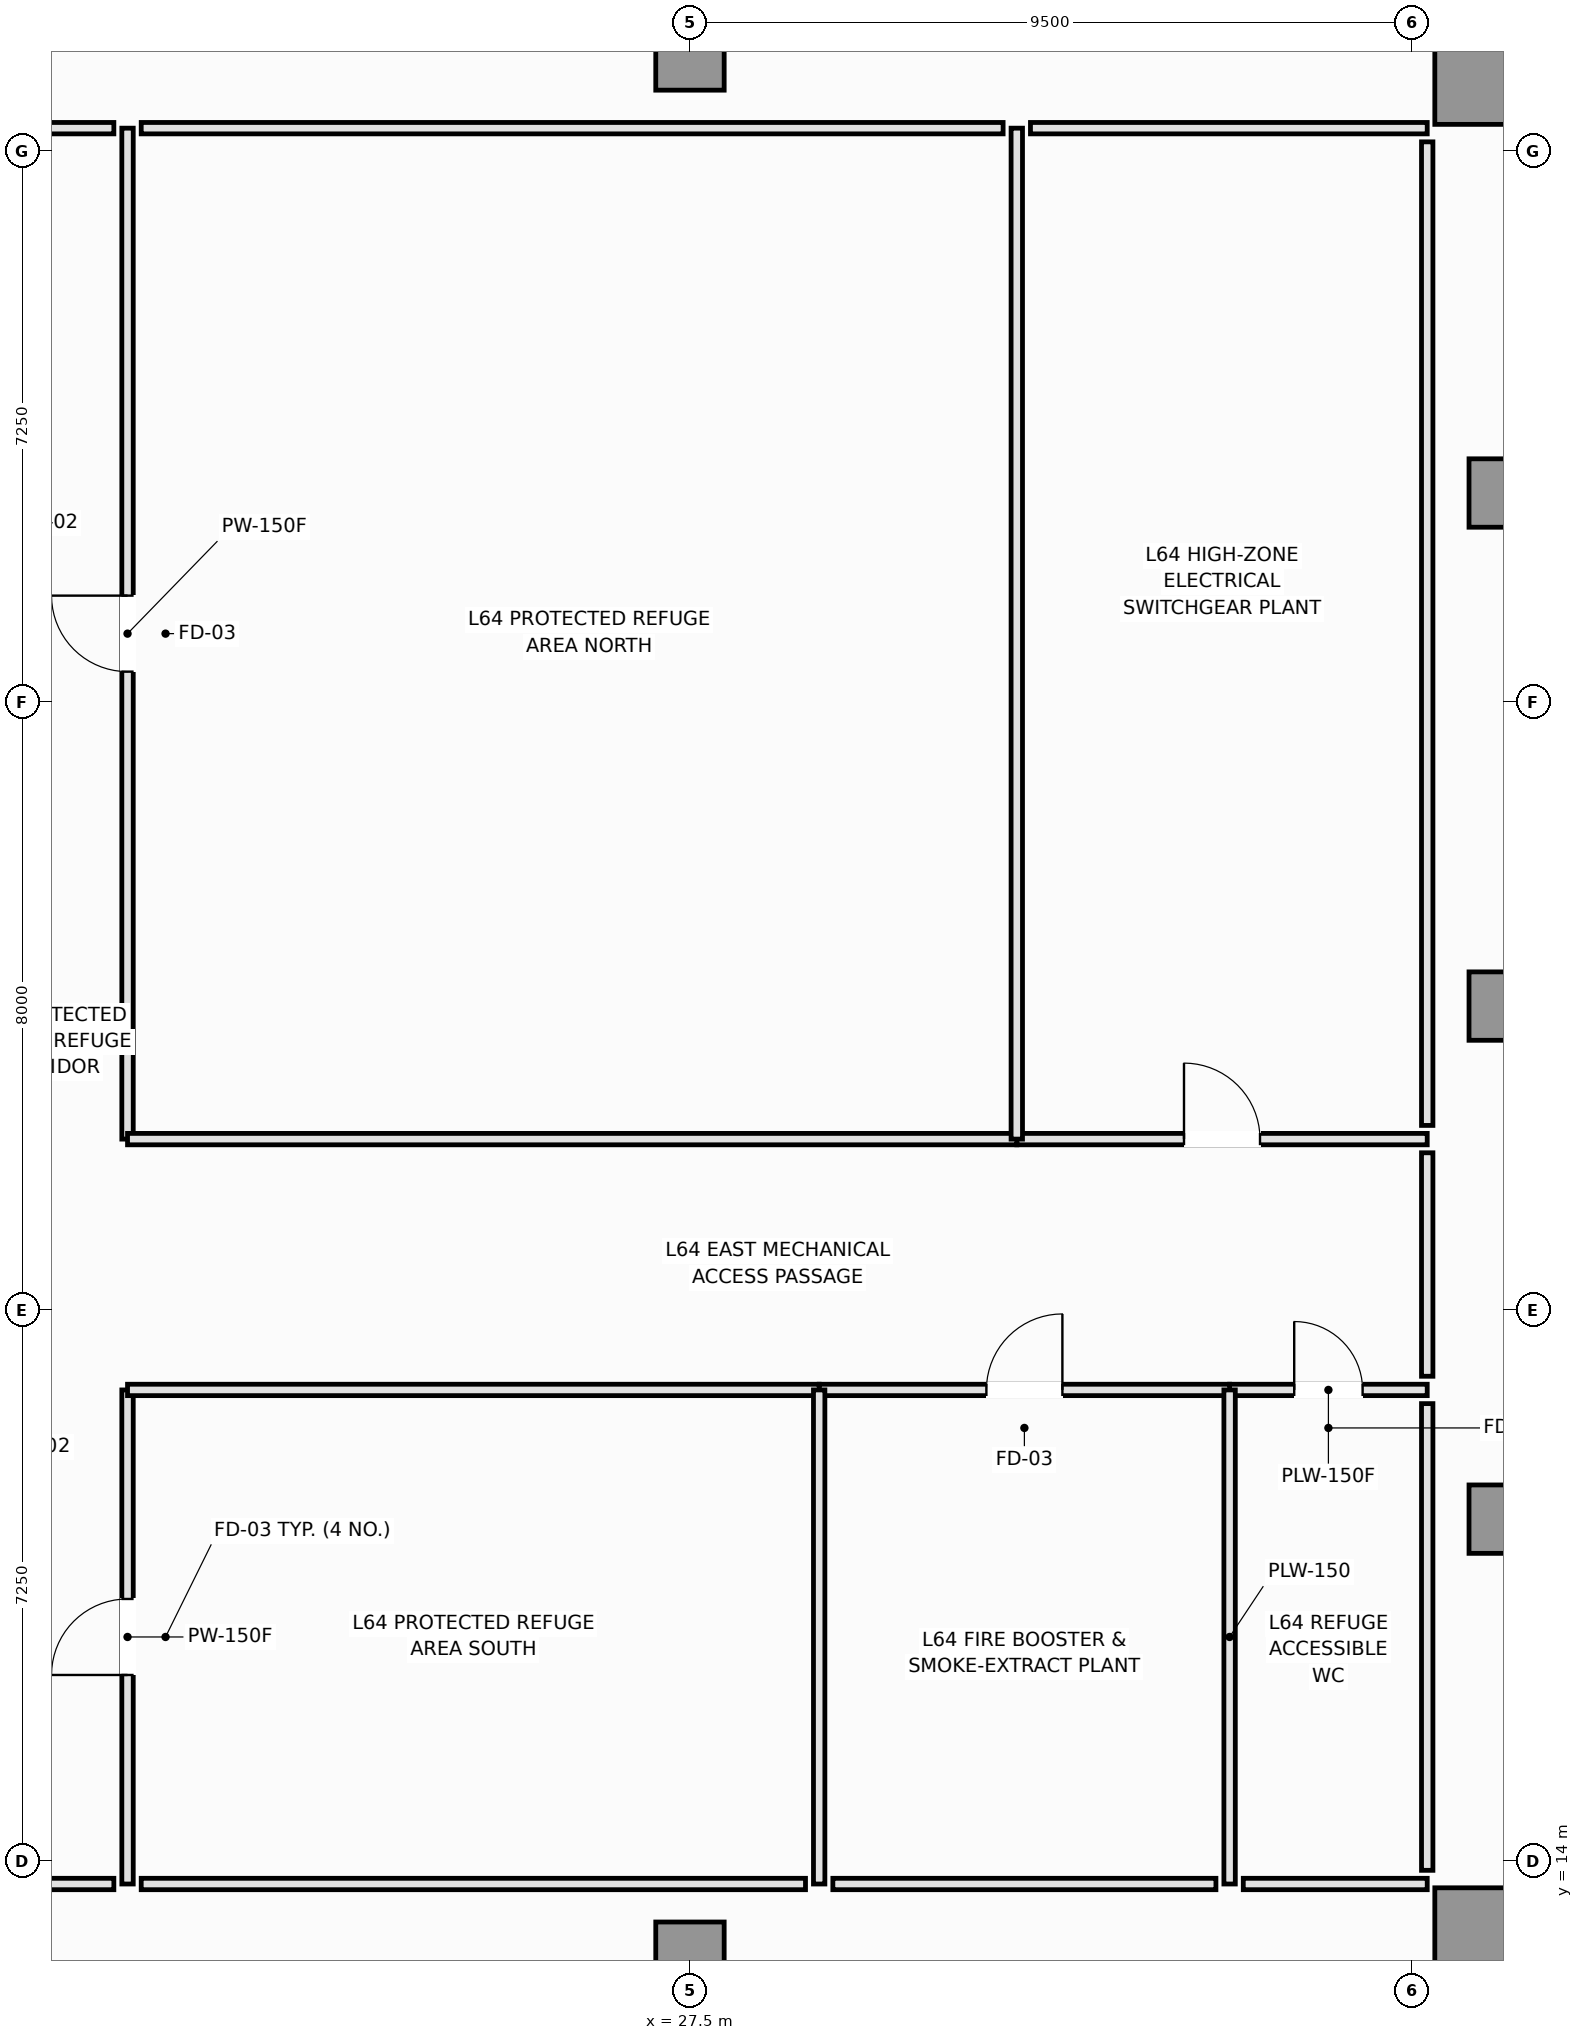
"""IFC4 building model, lengths in metres.
Left out: names, types, materials, properties, quantities, classifications, styles, units other than length and angle.
Written with IfcOpenShell. Run it as: python <this file> out.ifc"""

import sys

from ifc_helpers import new_model, si_unit, direction, frame, frame_2d, origin, origin_2d, place, context, subcontext, project, spatial, rectangle, extrude, element, fill, save


model = new_model("IFC4")
c1 = context("Model", 3, precision=1e-05, world=origin(), true_north=direction((0.0, 1.0)))
c2 = subcontext(c1, "Body", "Model", "MODEL_VIEW")
j1 = project(units=[si_unit("LENGTHUNIT", "METRE"), si_unit("PLANEANGLEUNIT", "RADIAN")], contexts=[c1])
p1 = place(None, origin())
s1 = spatial("IfcSite", under=j1, at=p1, CompositionType="ELEMENT")
p2 = place(p1, origin())
s2 = spatial("IfcBuilding", under=s1, at=p2, CompositionType="ELEMENT")
p3 = place(p2, frame((0.0, 0.0, 241.3)))
s3 = spatial("IfcBuildingStorey", under=s2, at=p3, CompositionType="ELEMENT", Elevation=241.3)
for number, where, z_axis, x_axis in (
    (1, (38.2, 12.75, 0.0), (0.0, 0.0, 1.0), (1.0, 0.0, 0.0)),
    (2, (38.2, 37.75, 0.0), (0.0, 0.0, 1.0), (1.0, 0.0, 0.0)),
):
    element("IfcColumn", number, at=place(p3, frame(where, z_axis=z_axis, x_axis=x_axis)), inside=s3, PredefinedType="COLUMN", context=c2, shape_type="SweptSolid", body=[
        extrude(rectangle(XDim=1.8, YDim=1.8, at=origin_2d()), origin(), (0.0, 0.0, 1.0), 3.55),
    ])
for number, where, z_axis, x_axis in (
    (3, (27.5, 12.75, 0.0), (0.0, 0.0, 1.0), (1.0, 0.0, 0.0)),
    (4, (27.5, 37.75, 0.0), (0.0, 0.0, 1.0), (1.0, 0.0, 0.0)),
    (5, (38.2, 18.5, 0.0), (0.0, 0.0, 1.0), (1.0, 0.0, 0.0)),
    (6, (38.2, 25.25, 0.0), (0.0, 0.0, 1.0), (1.0, 0.0, 0.0)),
    (7, (38.2, 32.0, 0.0), (0.0, 0.0, 1.0), (1.0, 0.0, 0.0)),
):
    element("IfcColumn", number, at=place(p3, frame(where, z_axis=z_axis, x_axis=x_axis)), inside=s3, PredefinedType="COLUMN", context=c2, shape_type="SweptSolid", body=[
        extrude(rectangle(XDim=0.9, YDim=0.9, at=origin_2d()), origin(), (0.0, 0.0, 1.0), 3.55),
    ])
p4 = place(p3, frame((20.1, 13.7, 0.0), z_axis=(0.0, 0.0, 1.0), x_axis=(0.0, 1.0, 0.0)))
e8 = element("IfcWall", 8, at=p4, inside=s3, PredefinedType="PARTITIONING", context=c2, shape_type="SweptSolid", body=[
    extrude(rectangle(XDim=6.5, YDim=0.15, at=frame_2d((3.25, 0.0))), origin(), (0.0, 0.0, 1.0), 3.39),
])
p5 = place(p4, frame((2.75, 0.0, 0.0)))
e9 = element("IfcOpeningElement", 9, at=p5, cuts=e8, PredefinedType="OPENING", context=c2, shape_type="SweptSolid", body=[
    extrude(rectangle(XDim=1.0, YDim=2.15, at=frame_2d((0.5, 1.075))), frame((0.0, 0.085, 0.0), z_axis=(0.0, -1.0, 0.0), x_axis=(1.0, 0.0, 0.0)), (0.0, 0.0, 1.0), 0.17),
])
p6 = place(p3, frame((20.1, 23.5, 0.0), z_axis=(0.0, 0.0, 1.0), x_axis=(0.0, 1.0, 0.0)))
e10 = element("IfcWall", 10, at=p6, inside=s3, PredefinedType="PARTITIONING", context=c2, shape_type="SweptSolid", body=[
    extrude(rectangle(XDim=13.3, YDim=0.15, at=frame_2d((6.65, 0.0))), origin(), (0.0, 0.0, 1.0), 3.39),
])
p7 = place(p6, frame((6.15, 0.0, 0.0)))
e11 = element("IfcOpeningElement", 11, at=p7, cuts=e10, PredefinedType="OPENING", context=c2, shape_type="SweptSolid", body=[
    extrude(rectangle(XDim=1.0, YDim=2.15, at=frame_2d((0.5, 1.075))), frame((0.0, 0.085, 0.0), z_axis=(0.0, -1.0, 0.0), x_axis=(1.0, 0.0, 0.0)), (0.0, 0.0, 1.0), 0.17),
])
p8 = place(p3, frame((34.6, 20.2, 0.0), z_axis=(0.0, 0.0, 1.0), x_axis=(1.0, 0.0, 0.0)))
e12 = element("IfcWall", 12, at=p8, inside=s3, PredefinedType="PLUMBINGWALL", context=c2, shape_type="SweptSolid", body=[
    extrude(rectangle(XDim=2.6, YDim=0.15, at=frame_2d((1.3, 0.0))), origin(), (0.0, 0.0, 1.0), 3.39),
])
p9 = place(p8, frame((0.85, 0.0, 0.0)))
e13 = element("IfcOpeningElement", 13, at=p9, cuts=e12, PredefinedType="OPENING", context=c2, shape_type="SweptSolid", body=[
    extrude(rectangle(XDim=0.9, YDim=2.1, at=frame_2d((0.45, 1.05))), frame((0.0, 0.085, 0.0), z_axis=(0.0, -1.0, 0.0), x_axis=(1.0, 0.0, 0.0)), (0.0, 0.0, 1.0), 0.17),
])
p10 = place(p3, frame((29.2, 20.2, 0.0), z_axis=(0.0, 0.0, 1.0), x_axis=(1.0, 0.0, 0.0)))
e14 = element("IfcWall", 14, at=p10, inside=s3, PredefinedType="PARTITIONING", context=c2, shape_type="SweptSolid", body=[
    extrude(rectangle(XDim=5.4, YDim=0.15, at=frame_2d((2.7, 0.0))), origin(), (0.0, 0.0, 1.0), 3.39),
])
p11 = place(p10, frame((2.2, 0.0, 0.0)))
e15 = element("IfcOpeningElement", 15, at=p11, cuts=e14, PredefinedType="OPENING", context=c2, shape_type="SweptSolid", body=[
    extrude(rectangle(XDim=1.0, YDim=2.15, at=frame_2d((0.5, 1.075))), frame((0.0, 0.085, 0.0), z_axis=(0.0, -1.0, 0.0), x_axis=(1.0, 0.0, 0.0)), (0.0, 0.0, 1.0), 0.17),
])
p12 = place(p3, frame((20.1, 20.2, 0.0), z_axis=(0.0, 0.0, 1.0), x_axis=(1.0, 0.0, 0.0)))
e16 = element("IfcWall", 16, at=p12, inside=s3, PredefinedType="PARTITIONING", context=c2, shape_type="SweptSolid", body=[
    extrude(rectangle(XDim=9.1, YDim=0.15, at=frame_2d((4.55, 0.0))), origin(), (0.0, 0.0, 1.0), 3.39),
])
p13 = place(p3, frame((31.8, 23.5, 0.0), z_axis=(0.0, 0.0, 1.0), x_axis=(1.0, 0.0, 0.0)))
e17 = element("IfcWall", 17, at=p13, inside=s3, PredefinedType="PARTITIONING", context=c2, shape_type="SweptSolid", body=[
    extrude(rectangle(XDim=5.4, YDim=0.15, at=frame_2d((2.7, 0.0))), origin(), (0.0, 0.0, 1.0), 3.39),
])
p14 = place(p13, frame((2.2, 0.0, 0.0)))
e18 = element("IfcOpeningElement", 18, at=p14, cuts=e17, PredefinedType="OPENING", context=c2, shape_type="SweptSolid", body=[
    extrude(rectangle(XDim=1.0, YDim=2.15, at=frame_2d((0.5, 1.075))), frame((0.0, 0.085, 0.0), z_axis=(0.0, -1.0, 0.0), x_axis=(1.0, 0.0, 0.0)), (0.0, 0.0, 1.0), 0.17),
])
p15 = place(p3, frame((20.1, 23.5, 0.0), z_axis=(0.0, 0.0, 1.0), x_axis=(1.0, 0.0, 0.0)))
e19 = element("IfcWall", 19, at=p15, inside=s3, PredefinedType="PARTITIONING", context=c2, shape_type="SweptSolid", body=[
    extrude(rectangle(XDim=11.7, YDim=0.15, at=frame_2d((5.85, 0.0))), origin(), (0.0, 0.0, 1.0), 3.39),
])
p16 = place(p3, frame((34.6, 13.7, 0.0), z_axis=(0.0, 0.0, 1.0), x_axis=(0.0, 1.0, 0.0)))
e20 = element("IfcWall", 20, at=p16, inside=s3, PredefinedType="PLUMBINGWALL", context=c2, shape_type="SweptSolid", body=[
    extrude(rectangle(XDim=6.5, YDim=0.15, at=frame_2d((3.25, 0.0))), origin(), (0.0, 0.0, 1.0), 3.39),
])
p17 = place(p3, frame((29.2, 13.7, 0.0), z_axis=(0.0, 0.0, 1.0), x_axis=(0.0, 1.0, 0.0)))
e21 = element("IfcWall", 21, at=p17, inside=s3, PredefinedType="PARTITIONING", context=c2, shape_type="SweptSolid", body=[
    extrude(rectangle(XDim=6.5, YDim=0.15, at=frame_2d((3.25, 0.0))), origin(), (0.0, 0.0, 1.0), 3.39),
])
p18 = place(p3, frame((31.8, 23.5, 0.0), z_axis=(0.0, 0.0, 1.0), x_axis=(0.0, 1.0, 0.0)))
e22 = element("IfcWall", 22, at=p18, inside=s3, PredefinedType="PARTITIONING", context=c2, shape_type="SweptSolid", body=[
    extrude(rectangle(XDim=13.3, YDim=0.15, at=frame_2d((6.65, 0.0))), origin(), (0.0, 0.0, 1.0), 3.39),
])
p19 = place(p3, frame((37.2, 13.7, 0.0), z_axis=(0.0, 0.0, 1.0), x_axis=(-1.0, 0.0, 0.0)))
e23 = element("IfcWall", 23, at=p19, inside=s3, PredefinedType="PARTITIONING", context=c2, shape_type="SweptSolid", body=[
    extrude(rectangle(XDim=2.42, YDim=0.15, at=frame_2d((1.21, 0.0))), origin(), (0.0, 0.0, 1.0), 3.39),
])
p20 = place(p3, frame((34.42, 13.7, 0.0), z_axis=(0.0, 0.0, 1.0), x_axis=(-1.0, 0.0, 0.0)))
e24 = element("IfcWall", 24, at=p20, inside=s3, PredefinedType="PARTITIONING", context=c2, shape_type="SweptSolid", body=[
    extrude(rectangle(XDim=5.04, YDim=0.15, at=frame_2d((2.52, 0.0))), origin(), (0.0, 0.0, 1.0), 3.39),
])
p21 = place(p3, frame((29.02, 13.7, 0.0), z_axis=(0.0, 0.0, 1.0), x_axis=(-1.0, 0.0, 0.0)))
e25 = element("IfcWall", 25, at=p21, inside=s3, PredefinedType="PARTITIONING", context=c2, shape_type="SweptSolid", body=[
    extrude(rectangle(XDim=8.74, YDim=0.15, at=frame_2d((4.37, 0.0))), origin(), (0.0, 0.0, 1.0), 3.39),
])
for number, where, z_axis, x_axis in (
    (26, (19.92, 13.7, 0.0), (0.0, 0.0, 1.0), (-1.0, 0.0, 0.0)),
    (27, (18.0, 36.8, 0.0), (0.0, 0.0, 1.0), (1.0, 0.0, 0.0)),
):
    element("IfcWall", number, at=place(p3, frame(where, z_axis=z_axis, x_axis=x_axis)), inside=s3, PredefinedType="PARTITIONING", context=c2, shape_type="SweptSolid", body=[
        extrude(rectangle(XDim=1.92, YDim=0.15, at=frame_2d((0.96, 0.0))), origin(), (0.0, 0.0, 1.0), 3.39),
    ])
p22 = place(p3, frame((20.28, 36.8, 0.0), z_axis=(0.0, 0.0, 1.0), x_axis=(1.0, 0.0, 0.0)))
e28 = element("IfcWall", 28, at=p22, inside=s3, PredefinedType="PARTITIONING", context=c2, shape_type="SweptSolid", body=[
    extrude(rectangle(XDim=11.34, YDim=0.15, at=frame_2d((5.67, 0.0))), origin(), (0.0, 0.0, 1.0), 3.39),
])
p23 = place(p3, frame((31.98, 36.8, 0.0), z_axis=(0.0, 0.0, 1.0), x_axis=(1.0, 0.0, 0.0)))
e29 = element("IfcWall", 29, at=p23, inside=s3, PredefinedType="PARTITIONING", context=c2, shape_type="SweptSolid", body=[
    extrude(rectangle(XDim=5.22, YDim=0.15, at=frame_2d((2.61, 0.0))), origin(), (0.0, 0.0, 1.0), 3.39),
])
p24 = place(p3, frame((37.2, 36.62, 0.0), z_axis=(0.0, 0.0, 1.0), x_axis=(0.0, -1.0, 0.0)))
e30 = element("IfcWall", 30, at=p24, inside=s3, PredefinedType="PARTITIONING", context=c2, shape_type="SweptSolid", body=[
    extrude(rectangle(XDim=12.94, YDim=0.15, at=frame_2d((6.47, 0.0))), origin(), (0.0, 0.0, 1.0), 3.39),
])
p25 = place(p3, frame((37.2, 23.32, 0.0), z_axis=(0.0, 0.0, 1.0), x_axis=(0.0, -1.0, 0.0)))
e31 = element("IfcWall", 31, at=p25, inside=s3, PredefinedType="PARTITIONING", context=c2, shape_type="SweptSolid", body=[
    extrude(rectangle(XDim=2.94, YDim=0.15, at=frame_2d((1.47, 0.0))), origin(), (0.0, 0.0, 1.0), 3.39),
])
p26 = place(p3, frame((37.2, 20.02, 0.0), z_axis=(0.0, 0.0, 1.0), x_axis=(0.0, -1.0, 0.0)))
e32 = element("IfcWall", 32, at=p26, inside=s3, PredefinedType="PARTITIONING", context=c2, shape_type="SweptSolid", body=[
    extrude(rectangle(XDim=6.14, YDim=0.15, at=frame_2d((3.07, 0.0))), origin(), (0.0, 0.0, 1.0), 3.39),
])
p27 = place(p5, origin())
e33 = element("IfcDoor", 33, at=p27, inside=s3, OperationType="SINGLE_SWING_LEFT", PredefinedType="DOOR", context=c2, shape_type="SweptSolid", body=[
    extrude(rectangle(XDim=1.0, YDim=2.15, at=frame_2d((0.5, 1.075))), frame((0.0, 0.025, 0.0), z_axis=(0.0, -1.0, 0.0), x_axis=(1.0, 0.0, 0.0)), (0.0, 0.0, 1.0), 0.05),
])
fill(e9, e33)
p28 = place(p7, origin())
e34 = element("IfcDoor", 34, at=p28, inside=s3, OperationType="SINGLE_SWING_RIGHT", PredefinedType="DOOR", context=c2, shape_type="SweptSolid", body=[
    extrude(rectangle(XDim=1.0, YDim=2.15, at=frame_2d((0.5, 1.075))), frame((0.0, 0.025, 0.0), z_axis=(0.0, -1.0, 0.0), x_axis=(1.0, 0.0, 0.0)), (0.0, 0.0, 1.0), 0.05),
])
fill(e11, e34)
p29 = place(p9, origin())
e35 = element("IfcDoor", 35, at=p29, inside=s3, OperationType="SINGLE_SWING_LEFT", PredefinedType="DOOR", context=c2, shape_type="SweptSolid", body=[
    extrude(rectangle(XDim=0.9, YDim=2.1, at=frame_2d((0.45, 1.05))), frame((0.0, 0.025, 0.0), z_axis=(0.0, -1.0, 0.0), x_axis=(1.0, 0.0, 0.0)), (0.0, 0.0, 1.0), 0.05),
])
fill(e13, e35)
p30 = place(p11, origin())
e36 = element("IfcDoor", 36, at=p30, inside=s3, OperationType="SINGLE_SWING_RIGHT", PredefinedType="DOOR", context=c2, shape_type="SweptSolid", body=[
    extrude(rectangle(XDim=1.0, YDim=2.15, at=frame_2d((0.5, 1.075))), frame((0.0, 0.025, 0.0), z_axis=(0.0, -1.0, 0.0), x_axis=(1.0, 0.0, 0.0)), (0.0, 0.0, 1.0), 0.05),
])
fill(e15, e36)
p31 = place(p14, origin())
e37 = element("IfcDoor", 37, at=p31, inside=s3, OperationType="SINGLE_SWING_LEFT", PredefinedType="DOOR", context=c2, shape_type="SweptSolid", body=[
    extrude(rectangle(XDim=1.0, YDim=2.15, at=frame_2d((0.5, 1.075))), frame((0.0, 0.025, 0.0), z_axis=(0.0, -1.0, 0.0), x_axis=(1.0, 0.0, 0.0)), (0.0, 0.0, 1.0), 0.05),
])
fill(e18, e37)
save(model, sys.argv[1])
